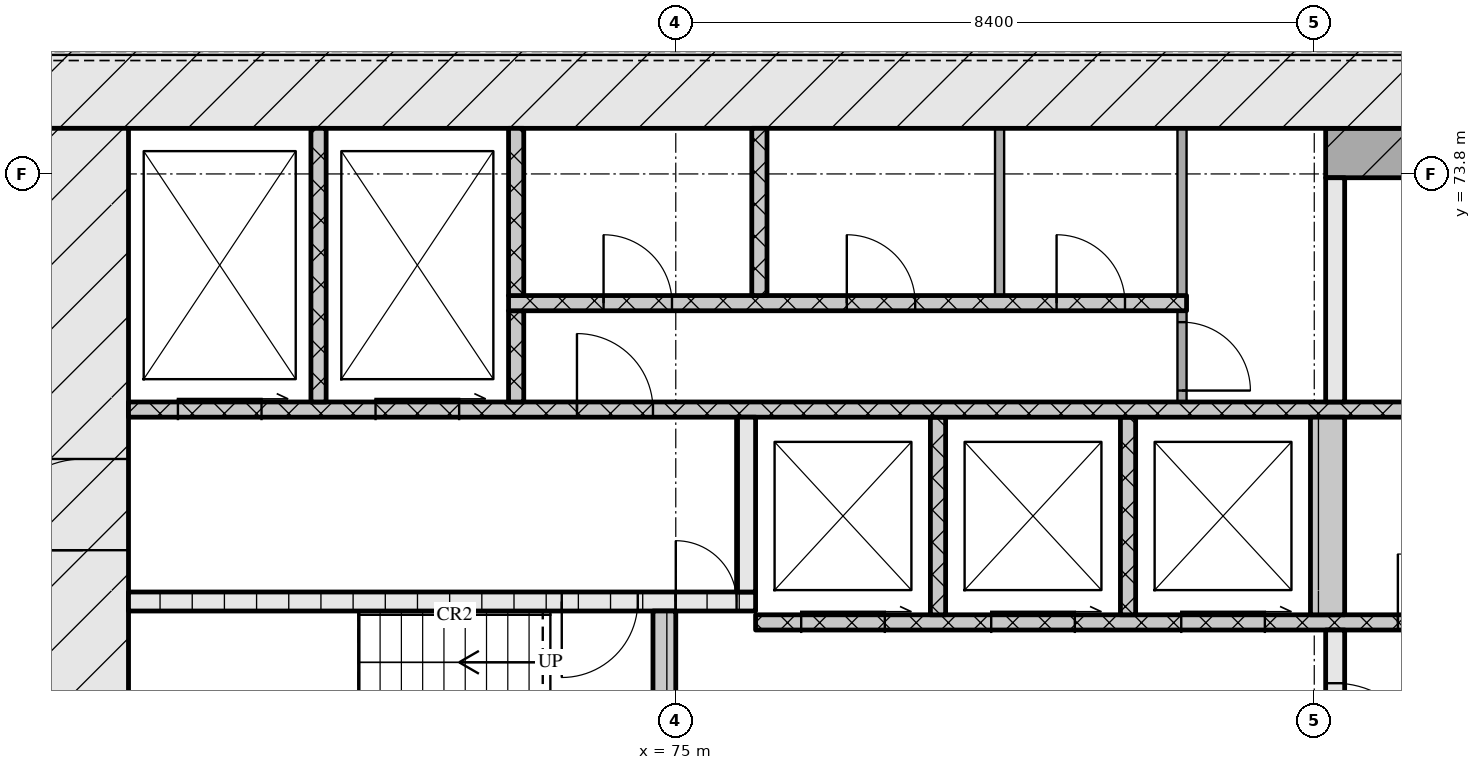
"""IFC4 building model, lengths in metres.
Left out: names, types, materials, properties, quantities, classifications, styles, units other than length and angle.
Written with IfcOpenShell. Run it as: python <this file> out.ifc"""

import sys

from ifc_helpers import new_model, si_unit, direction, frame, frame_2d, origin, place, context, subcontext, project, spatial, rectangle, extrude, element, fill, save


model = new_model("IFC4")
c1 = context("Model", 3, precision=1e-05, world=origin(), true_north=direction((0.0, 1.0)))
c2 = subcontext(c1, "Body", "Model", "MODEL_VIEW")
j1 = project(units=[si_unit("LENGTHUNIT", "METRE"), si_unit("PLANEANGLEUNIT", "RADIAN")], contexts=[c1])
p1 = place(None, origin())
s1 = spatial("IfcSite", under=j1, at=p1, CompositionType="ELEMENT")
p2 = place(p1, origin())
s2 = spatial("IfcBuilding", under=s1, at=p2, CompositionType="ELEMENT")
p3 = place(p2, frame((0.0, 0.0, 44.4)))
s3 = spatial("IfcBuildingStorey", under=s2, at=p3, CompositionType="ELEMENT", Elevation=44.4)
p4 = place(p3, frame((66.6, 75.0, 0.0), z_axis=(0.0, 0.0, 1.0), x_axis=(1.0, 0.0, 0.0)))
e1 = element("IfcWall", 1, at=p4, inside=s3, PredefinedType="SOLIDWALL", context=c2, shape_type="SweptSolid", body=[
    extrude(rectangle(XDim=42.0, YDim=1.2, at=frame_2d((21.0, 0.0))), origin(), (0.0, 0.0, 1.0), 3.32),
])
p5 = place(p3, frame((67.2, 62.4, 0.0), z_axis=(0.0, 0.0, 1.0), x_axis=(0.0, 1.0, 0.0)))
e2 = element("IfcWall", 2, at=p5, inside=s3, PredefinedType="SOLIDWALL", context=c2, shape_type="SweptSolid", body=[
    extrude(rectangle(XDim=12.0, YDim=1.2, at=frame_2d((6.0, 0.0))), origin(), (0.0, 0.0, 1.0), 3.32),
])
p6 = place(p5, frame((6.45, 0.0, 0.0)))
e3 = element("IfcOpeningElement", 3, at=p6, cuts=e2, PredefinedType="OPENING", context=c2, shape_type="SweptSolid", body=[
    extrude(rectangle(XDim=1.2, YDim=2.1, at=frame_2d((0.6, 1.05))), frame((0.0, 0.61, 0.0), z_axis=(0.0, -1.0, 0.0), x_axis=(1.0, 0.0, 0.0)), (0.0, 0.0, 1.0), 1.22),
])
p7 = place(p3, frame((74.85, 65.2, 0.0), z_axis=(0.0, 0.0, 1.0), x_axis=(0.0, 1.0, 0.0)))
e4 = element("IfcWall", 4, at=p7, inside=s3, PredefinedType="SOLIDWALL", context=c2, shape_type="SweptSolid", body=[
    extrude(rectangle(XDim=2.85, YDim=0.3, at=frame_2d((1.425, 0.0))), origin(), (0.0, 0.0, 1.0), 3.32),
])
p8 = place(p3, frame((83.675, 65.2, 0.0), z_axis=(0.0, 0.0, 1.0), x_axis=(0.0, 1.0, 0.0)))
e5 = element("IfcWall", 5, at=p8, inside=s3, PredefinedType="SOLIDWALL", context=c2, shape_type="SweptSolid", body=[
    extrude(rectangle(XDim=2.6, YDim=0.25, at=frame_2d((1.3, 0.0))), origin(), (0.0, 0.0, 1.0), 3.32),
])
p9 = place(p8, frame((0.7, 0.0, 0.0)))
e6 = element("IfcOpeningElement", 6, at=p9, cuts=e5, PredefinedType="OPENING", context=c2, shape_type="SweptSolid", body=[
    extrude(rectangle(XDim=1.2, YDim=2.1, at=frame_2d((0.6, 1.05))), frame((0.0, 0.135, 0.0), z_axis=(0.0, -1.0, 0.0), x_axis=(1.0, 0.0, 0.0)), (0.0, 0.0, 1.0), 0.27),
])
p10 = place(p3, frame((76.05, 67.9, 0.0), z_axis=(0.0, 0.0, 1.0), x_axis=(1.0, 0.0, 0.0)))
e7 = element("IfcWall", 7, at=p10, inside=s3, PredefinedType="SOLIDWALL", context=c2, shape_type="SweptSolid", body=[
    extrude(rectangle(XDim=23.1, YDim=0.2, at=frame_2d((11.55, 0.0))), origin(), (0.0, 0.0, 1.0), 3.32),
])
p11 = place(p10, frame((0.6, 0.0, 0.0)))
e8 = element("IfcOpeningElement", 8, at=p11, cuts=e7, PredefinedType="OPENING", context=c2, shape_type="SweptSolid", body=[
    extrude(rectangle(XDim=1.1, YDim=2.1, at=frame_2d((0.55, 1.05))), frame((0.0, 0.11, 0.0), z_axis=(0.0, -1.0, 0.0), x_axis=(1.0, 0.0, 0.0)), (0.0, 0.0, 1.0), 0.22),
])
p12 = place(p10, frame((3.1, 0.0, 0.0)))
e9 = element("IfcOpeningElement", 9, at=p12, cuts=e7, PredefinedType="OPENING", context=c2, shape_type="SweptSolid", body=[
    extrude(rectangle(XDim=1.1, YDim=2.1, at=frame_2d((0.55, 1.05))), frame((0.0, 0.11, 0.0), z_axis=(0.0, -1.0, 0.0), x_axis=(1.0, 0.0, 0.0)), (0.0, 0.0, 1.0), 0.22),
])
p13 = place(p10, frame((5.6, 0.0, 0.0)))
e10 = element("IfcOpeningElement", 10, at=p13, cuts=e7, PredefinedType="OPENING", context=c2, shape_type="SweptSolid", body=[
    extrude(rectangle(XDim=1.1, YDim=2.1, at=frame_2d((0.55, 1.05))), frame((0.0, 0.11, 0.0), z_axis=(0.0, -1.0, 0.0), x_axis=(1.0, 0.0, 0.0)), (0.0, 0.0, 1.0), 0.22),
])
p14 = place(p10, frame((8.45, 0.0, 0.0)))
e11 = element("IfcOpeningElement", 11, at=p14, cuts=e7, PredefinedType="OPENING", context=c2, shape_type="SweptSolid", body=[
    extrude(rectangle(XDim=0.9, YDim=2.1, at=frame_2d((0.45, 1.05))), frame((0.0, 0.11, 0.0), z_axis=(0.0, -1.0, 0.0), x_axis=(1.0, 0.0, 0.0)), (0.0, 0.0, 1.0), 0.22),
])
p15 = place(p10, frame((10.91, 0.0, 0.0)))
e12 = element("IfcOpeningElement", 12, at=p15, cuts=e7, PredefinedType="OPENING", context=c2, shape_type="SweptSolid", body=[
    extrude(rectangle(XDim=0.9, YDim=2.1, at=frame_2d((0.45, 1.05))), frame((0.0, 0.11, 0.0), z_axis=(0.0, -1.0, 0.0), x_axis=(1.0, 0.0, 0.0)), (0.0, 0.0, 1.0), 0.22),
])
p16 = place(p10, frame((13.55, 0.0, 0.0)))
e13 = element("IfcOpeningElement", 13, at=p16, cuts=e7, PredefinedType="OPENING", context=c2, shape_type="SweptSolid", body=[
    extrude(rectangle(XDim=1.0, YDim=2.1, at=frame_2d((0.5, 1.05))), frame((0.0, 0.11, 0.0), z_axis=(0.0, -1.0, 0.0), x_axis=(1.0, 0.0, 0.0)), (0.0, 0.0, 1.0), 0.22),
])
for number, where, z_axis, x_axis in (
    (14, (78.45, 68.0, 0.0), (0.0, 0.0, 1.0), (0.0, 1.0, 0.0)),
    (15, (80.95, 68.0, 0.0), (0.0, 0.0, 1.0), (0.0, 1.0, 0.0)),
):
    element("IfcWall", number, at=place(p3, frame(where, z_axis=z_axis, x_axis=x_axis)), inside=s3, PredefinedType="SOLIDWALL", context=c2, shape_type="SweptSolid", body=[
        extrude(rectangle(XDim=2.6, YDim=0.2, at=frame_2d((1.3, 0.0))), origin(), (0.0, 0.0, 1.0), 3.32),
    ])
p17 = place(p3, frame((83.575, 68.0, 0.0), z_axis=(0.0, 0.0, 1.0), x_axis=(0.0, 1.0, 0.0)))
e16 = element("IfcWall", 16, at=p17, inside=s3, PredefinedType="SOLIDWALL", context=c2, shape_type="SweptSolid", body=[
    extrude(rectangle(XDim=2.6, YDim=0.45, at=frame_2d((1.3, 0.0))), origin(), (0.0, 0.0, 1.0), 3.32),
])
p18 = place(p3, frame((67.8, 68.175, 0.0), z_axis=(0.0, 0.0, 1.0), x_axis=(1.0, 0.0, 0.0)))
e17 = element("IfcWall", 17, at=p18, inside=s3, PredefinedType="SOLIDWALL", context=c2, shape_type="SweptSolid", body=[
    extrude(rectangle(XDim=8.25, YDim=0.25, at=frame_2d((4.125, 0.0))), origin(), (0.0, 0.0, 1.0), 3.32),
])
p19 = place(p18, frame((5.7, 0.0, 0.0)))
e18 = element("IfcOpeningElement", 18, at=p19, cuts=e17, PredefinedType="OPENING", context=c2, shape_type="SweptSolid", body=[
    extrude(rectangle(XDim=1.0, YDim=2.1, at=frame_2d((0.5, 1.05))), frame((0.0, 0.135, 0.0), z_axis=(0.0, -1.0, 0.0), x_axis=(1.0, 0.0, 0.0)), (0.0, 0.0, 1.0), 0.27),
])
p20 = place(p18, frame((7.2, 0.0, 0.0)))
e19 = element("IfcOpeningElement", 19, at=p20, cuts=e17, PredefinedType="OPENING", context=c2, shape_type="SweptSolid", body=[
    extrude(rectangle(XDim=0.8, YDim=2.1, at=frame_2d((0.4, 1.05))), frame((0.0, 0.135, 0.0), z_axis=(0.0, -1.0, 0.0), x_axis=(1.0, 0.0, 0.0)), (0.0, 0.0, 1.0), 0.27),
])
p21 = place(p3, frame((75.925, 68.3, 0.0), z_axis=(0.0, 0.0, 1.0), x_axis=(0.0, 1.0, 0.0)))
e20 = element("IfcWall", 20, at=p21, inside=s3, PredefinedType="SOLIDWALL", context=c2, shape_type="SweptSolid", body=[
    extrude(rectangle(XDim=2.3, YDim=0.25, at=frame_2d((1.15, 0.0))), origin(), (0.0, 0.0, 1.0), 3.32),
])
p22 = place(p3, frame((67.8, 70.7, 0.0), z_axis=(0.0, 0.0, 1.0), x_axis=(1.0, 0.0, 0.0)))
e21 = element("IfcWall", 21, at=p22, inside=s3, PredefinedType="SOLIDWALL", context=c2, shape_type="SweptSolid", body=[
    extrude(rectangle(XDim=39.6, YDim=0.2, at=frame_2d((19.8, 0.0))), origin(), (0.0, 0.0, 1.0), 3.32),
])
p23 = place(p22, frame((0.65, 0.0, 0.0)))
e22 = element("IfcOpeningElement", 22, at=p23, cuts=e21, PredefinedType="OPENING", context=c2, shape_type="SweptSolid", body=[
    extrude(rectangle(XDim=1.1, YDim=2.1, at=frame_2d((0.55, 1.05))), frame((0.0, 0.11, 0.0), z_axis=(0.0, -1.0, 0.0), x_axis=(1.0, 0.0, 0.0)), (0.0, 0.0, 1.0), 0.22),
])
p24 = place(p22, frame((3.25, 0.0, 0.0)))
e23 = element("IfcOpeningElement", 23, at=p24, cuts=e21, PredefinedType="OPENING", context=c2, shape_type="SweptSolid", body=[
    extrude(rectangle(XDim=1.1, YDim=2.1, at=frame_2d((0.55, 1.05))), frame((0.0, 0.11, 0.0), z_axis=(0.0, -1.0, 0.0), x_axis=(1.0, 0.0, 0.0)), (0.0, 0.0, 1.0), 0.22),
])
p25 = place(p22, frame((5.9, 0.0, 0.0)))
e24 = element("IfcOpeningElement", 24, at=p25, cuts=e21, PredefinedType="OPENING", context=c2, shape_type="SweptSolid", body=[
    extrude(rectangle(XDim=1.0, YDim=2.1, at=frame_2d((0.5, 1.05))), frame((0.0, 0.11, 0.0), z_axis=(0.0, -1.0, 0.0), x_axis=(1.0, 0.0, 0.0)), (0.0, 0.0, 1.0), 0.22),
])
p26 = place(p22, frame((21.7, 0.0, 0.0)))
e25 = element("IfcOpeningElement", 25, at=p26, cuts=e21, PredefinedType="OPENING", context=c2, shape_type="SweptSolid", body=[
    extrude(rectangle(XDim=1.0, YDim=2.1, at=frame_2d((0.5, 1.05))), frame((0.0, 0.11, 0.0), z_axis=(0.0, -1.0, 0.0), x_axis=(1.0, 0.0, 0.0)), (0.0, 0.0, 1.0), 0.22),
])
p27 = place(p22, frame((32.7, 0.0, 0.0)))
e26 = element("IfcOpeningElement", 26, at=p27, cuts=e21, PredefinedType="OPENING", context=c2, shape_type="SweptSolid", body=[
    extrude(rectangle(XDim=1.0, YDim=2.1, at=frame_2d((0.5, 1.05))), frame((0.0, 0.11, 0.0), z_axis=(0.0, -1.0, 0.0), x_axis=(1.0, 0.0, 0.0)), (0.0, 0.0, 1.0), 0.22),
])
p28 = place(p22, frame((35.25, 0.0, 0.0)))
e27 = element("IfcOpeningElement", 27, at=p28, cuts=e21, PredefinedType="OPENING", context=c2, shape_type="SweptSolid", body=[
    extrude(rectangle(XDim=1.1, YDim=2.1, at=frame_2d((0.55, 1.05))), frame((0.0, 0.11, 0.0), z_axis=(0.0, -1.0, 0.0), x_axis=(1.0, 0.0, 0.0)), (0.0, 0.0, 1.0), 0.22),
])
p29 = place(p22, frame((37.85, 0.0, 0.0)))
e28 = element("IfcOpeningElement", 28, at=p29, cuts=e21, PredefinedType="OPENING", context=c2, shape_type="SweptSolid", body=[
    extrude(rectangle(XDim=1.1, YDim=2.1, at=frame_2d((0.55, 1.05))), frame((0.0, 0.11, 0.0), z_axis=(0.0, -1.0, 0.0), x_axis=(1.0, 0.0, 0.0)), (0.0, 0.0, 1.0), 0.22),
])
p30 = place(p3, frame((70.3, 70.8, 0.0), z_axis=(0.0, 0.0, 1.0), x_axis=(0.0, 1.0, 0.0)))
e29 = element("IfcWall", 29, at=p30, inside=s3, PredefinedType="SOLIDWALL", context=c2, shape_type="SweptSolid", body=[
    extrude(rectangle(XDim=3.6, YDim=0.2, at=frame_2d((1.8, 0.0))), origin(), (0.0, 0.0, 1.0), 3.32),
])
p31 = place(p3, frame((72.9, 70.8, 0.0), z_axis=(0.0, 0.0, 1.0), x_axis=(0.0, 1.0, 0.0)))
e30 = element("IfcWall", 30, at=p31, inside=s3, PredefinedType="SOLIDWALL", context=c2, shape_type="SweptSolid", body=[
    extrude(rectangle(XDim=1.2, YDim=0.2, at=frame_2d((0.6, 0.0))), origin(), (0.0, 0.0, 1.0), 3.32),
])
p32 = place(p3, frame((81.66, 70.8, 0.0), z_axis=(0.0, 0.0, 1.0), x_axis=(0.0, 1.0, 0.0)))
e31 = element("IfcWall", 31, at=p32, inside=s3, PredefinedType="PARTITIONING", context=c2, shape_type="SweptSolid", body=[
    extrude(rectangle(XDim=1.2, YDim=0.12, at=frame_2d((0.6, 0.0))), origin(), (0.0, 0.0, 1.0), 3.32),
])
p33 = place(p32, frame((0.15, 0.0, 0.0)))
e32 = element("IfcOpeningElement", 32, at=p33, cuts=e31, PredefinedType="OPENING", context=c2, shape_type="SweptSolid", body=[
    extrude(rectangle(XDim=0.9, YDim=2.1, at=frame_2d((0.45, 1.05))), frame((0.0, 0.07, 0.0), z_axis=(0.0, -1.0, 0.0), x_axis=(1.0, 0.0, 0.0)), (0.0, 0.0, 1.0), 0.14),
])
p34 = place(p3, frame((83.675, 70.8, 0.0), z_axis=(0.0, 0.0, 1.0), x_axis=(0.0, 1.0, 0.0)))
e33 = element("IfcWall", 33, at=p34, inside=s3, PredefinedType="SOLIDWALL", context=c2, shape_type="SweptSolid", body=[
    extrude(rectangle(XDim=2.95, YDim=0.25, at=frame_2d((1.475, 0.0))), origin(), (0.0, 0.0, 1.0), 3.32),
])
p35 = place(p3, frame((72.8, 72.1, 0.0), z_axis=(0.0, 0.0, 1.0), x_axis=(1.0, 0.0, 0.0)))
e34 = element("IfcWall", 34, at=p35, inside=s3, PredefinedType="SOLIDWALL", context=c2, shape_type="SweptSolid", body=[
    extrude(rectangle(XDim=8.92, YDim=0.2, at=frame_2d((4.46, 0.0))), origin(), (0.0, 0.0, 1.0), 3.32),
])
p36 = place(p35, frame((1.25, 0.0, 0.0)))
e35 = element("IfcOpeningElement", 35, at=p36, cuts=e34, PredefinedType="OPENING", context=c2, shape_type="SweptSolid", body=[
    extrude(rectangle(XDim=0.9, YDim=2.1, at=frame_2d((0.45, 1.05))), frame((0.0, 0.11, 0.0), z_axis=(0.0, -1.0, 0.0), x_axis=(1.0, 0.0, 0.0)), (0.0, 0.0, 1.0), 0.22),
])
p37 = place(p35, frame((4.45, 0.0, 0.0)))
e36 = element("IfcOpeningElement", 36, at=p37, cuts=e34, PredefinedType="OPENING", context=c2, shape_type="SweptSolid", body=[
    extrude(rectangle(XDim=0.9, YDim=2.1, at=frame_2d((0.45, 1.05))), frame((0.0, 0.11, 0.0), z_axis=(0.0, -1.0, 0.0), x_axis=(1.0, 0.0, 0.0)), (0.0, 0.0, 1.0), 0.22),
])
p38 = place(p35, frame((7.21, 0.0, 0.0)))
e37 = element("IfcOpeningElement", 37, at=p38, cuts=e34, PredefinedType="OPENING", context=c2, shape_type="SweptSolid", body=[
    extrude(rectangle(XDim=0.9, YDim=2.1, at=frame_2d((0.45, 1.05))), frame((0.0, 0.11, 0.0), z_axis=(0.0, -1.0, 0.0), x_axis=(1.0, 0.0, 0.0)), (0.0, 0.0, 1.0), 0.22),
])
for number, where, z_axis, x_axis in (
    (38, (72.9, 72.2, 0.0), (0.0, 0.0, 1.0), (0.0, 1.0, 0.0)),
    (39, (76.1, 72.2, 0.0), (0.0, 0.0, 1.0), (0.0, 1.0, 0.0)),
):
    element("IfcWall", number, at=place(p3, frame(where, z_axis=z_axis, x_axis=x_axis)), inside=s3, PredefinedType="SOLIDWALL", context=c2, shape_type="SweptSolid", body=[
        extrude(rectangle(XDim=2.2, YDim=0.2, at=frame_2d((1.1, 0.0))), origin(), (0.0, 0.0, 1.0), 3.32),
    ])
for number, where, z_axis, x_axis in (
    (40, (79.26, 72.2, 0.0), (0.0, 0.0, 1.0), (0.0, 1.0, 0.0)),
    (41, (81.66, 72.2, 0.0), (0.0, 0.0, 1.0), (0.0, 1.0, 0.0)),
):
    element("IfcWall", number, at=place(p3, frame(where, z_axis=z_axis, x_axis=x_axis)), inside=s3, PredefinedType="PARTITIONING", context=c2, shape_type="SweptSolid", body=[
        extrude(rectangle(XDim=2.2, YDim=0.12, at=frame_2d((1.1, 0.0))), origin(), (0.0, 0.0, 1.0), 3.32),
    ])
p39 = place(p3, frame((83.55, 74.075, 0.0), z_axis=(0.0, 0.0, 1.0), x_axis=(1.0, 0.0, 0.0)))
e42 = element("IfcWall", 42, at=p39, inside=s3, PredefinedType="SOLIDWALL", context=c2, shape_type="SweptSolid", body=[
    extrude(rectangle(XDim=8.1, YDim=0.65, at=frame_2d((4.05, 0.0))), origin(), (0.0, 0.0, 1.0), 3.32),
])
p40 = place(p9, origin())
e43 = element("IfcDoor", 43, at=p40, inside=s3, OperationType="SINGLE_SWING_RIGHT", PredefinedType="DOOR", context=c2, shape_type="SweptSolid", body=[
    extrude(rectangle(XDim=1.2, YDim=2.1, at=frame_2d((0.6, 1.05))), frame((0.0, 0.025, 0.0), z_axis=(0.0, -1.0, 0.0), x_axis=(1.0, 0.0, 0.0)), (0.0, 0.0, 1.0), 0.05),
])
fill(e6, e43)
p41 = place(p11, origin())
e44 = element("IfcDoor", 44, at=p41, inside=s3, OperationType="SLIDING_TO_RIGHT", PredefinedType="DOOR", context=c2, shape_type="SweptSolid", body=[
    extrude(rectangle(XDim=1.1, YDim=2.1, at=frame_2d((0.55, 1.05))), frame((0.0, 0.025, 0.0), z_axis=(0.0, -1.0, 0.0), x_axis=(1.0, 0.0, 0.0)), (0.0, 0.0, 1.0), 0.05),
])
fill(e8, e44)
p42 = place(p12, origin())
e45 = element("IfcDoor", 45, at=p42, inside=s3, OperationType="SLIDING_TO_RIGHT", PredefinedType="DOOR", context=c2, shape_type="SweptSolid", body=[
    extrude(rectangle(XDim=1.1, YDim=2.1, at=frame_2d((0.55, 1.05))), frame((0.0, 0.025, 0.0), z_axis=(0.0, -1.0, 0.0), x_axis=(1.0, 0.0, 0.0)), (0.0, 0.0, 1.0), 0.05),
])
fill(e9, e45)
p43 = place(p13, origin())
e46 = element("IfcDoor", 46, at=p43, inside=s3, OperationType="SLIDING_TO_RIGHT", PredefinedType="DOOR", context=c2, shape_type="SweptSolid", body=[
    extrude(rectangle(XDim=1.1, YDim=2.1, at=frame_2d((0.55, 1.05))), frame((0.0, 0.025, 0.0), z_axis=(0.0, -1.0, 0.0), x_axis=(1.0, 0.0, 0.0)), (0.0, 0.0, 1.0), 0.05),
])
fill(e10, e46)
p44 = place(p14, origin())
e47 = element("IfcDoor", 47, at=p44, inside=s3, OperationType="SINGLE_SWING_LEFT", PredefinedType="DOOR", context=c2, shape_type="SweptSolid", body=[
    extrude(rectangle(XDim=0.9, YDim=2.1, at=frame_2d((0.45, 1.05))), frame((0.0, 0.025, 0.0), z_axis=(0.0, -1.0, 0.0), x_axis=(1.0, 0.0, 0.0)), (0.0, 0.0, 1.0), 0.05),
])
fill(e11, e47)
p45 = place(p19, origin())
e48 = element("IfcDoor", 48, at=p45, inside=s3, OperationType="SINGLE_SWING_RIGHT", PredefinedType="DOOR", context=c2, shape_type="SweptSolid", body=[
    extrude(rectangle(XDim=1.0, YDim=2.1, at=frame_2d((0.5, 1.05))), frame((0.0, 0.025, 0.0), z_axis=(0.0, -1.0, 0.0), x_axis=(1.0, 0.0, 0.0)), (0.0, 0.0, 1.0), 0.05),
])
fill(e18, e48)
p46 = place(p20, origin())
e49 = element("IfcDoor", 49, at=p46, inside=s3, OperationType="SINGLE_SWING_LEFT", PredefinedType="DOOR", context=c2, shape_type="SweptSolid", body=[
    extrude(rectangle(XDim=0.8, YDim=2.1, at=frame_2d((0.4, 1.05))), frame((0.0, 0.025, 0.0), z_axis=(0.0, -1.0, 0.0), x_axis=(1.0, 0.0, 0.0)), (0.0, 0.0, 1.0), 0.05),
])
fill(e19, e49)
p47 = place(p6, origin())
e50 = element("IfcDoor", 50, at=p47, inside=s3, OperationType="SINGLE_SWING_LEFT", PredefinedType="DOOR", context=c2, shape_type="SweptSolid", body=[
    extrude(rectangle(XDim=1.2, YDim=2.1, at=frame_2d((0.6, 1.05))), frame((0.0, 0.025, 0.0), z_axis=(0.0, -1.0, 0.0), x_axis=(1.0, 0.0, 0.0)), (0.0, 0.0, 1.0), 0.05),
])
fill(e3, e50)
p48 = place(p23, origin())
e51 = element("IfcDoor", 51, at=p48, inside=s3, OperationType="SLIDING_TO_RIGHT", PredefinedType="DOOR", context=c2, shape_type="SweptSolid", body=[
    extrude(rectangle(XDim=1.1, YDim=2.1, at=frame_2d((0.55, 1.05))), frame((0.0, 0.025, 0.0), z_axis=(0.0, -1.0, 0.0), x_axis=(1.0, 0.0, 0.0)), (0.0, 0.0, 1.0), 0.05),
])
fill(e22, e51)
p49 = place(p24, origin())
e52 = element("IfcDoor", 52, at=p49, inside=s3, OperationType="SLIDING_TO_RIGHT", PredefinedType="DOOR", context=c2, shape_type="SweptSolid", body=[
    extrude(rectangle(XDim=1.1, YDim=2.1, at=frame_2d((0.55, 1.05))), frame((0.0, 0.025, 0.0), z_axis=(0.0, -1.0, 0.0), x_axis=(1.0, 0.0, 0.0)), (0.0, 0.0, 1.0), 0.05),
])
fill(e23, e52)
p50 = place(p25, origin())
e53 = element("IfcDoor", 53, at=p50, inside=s3, OperationType="SINGLE_SWING_LEFT", PredefinedType="DOOR", context=c2, shape_type="SweptSolid", body=[
    extrude(rectangle(XDim=1.0, YDim=2.1, at=frame_2d((0.5, 1.05))), frame((0.0, 0.025, 0.0), z_axis=(0.0, -1.0, 0.0), x_axis=(1.0, 0.0, 0.0)), (0.0, 0.0, 1.0), 0.05),
])
fill(e24, e53)
p51 = place(p33, origin())
e54 = element("IfcDoor", 54, at=p51, inside=s3, OperationType="SINGLE_SWING_RIGHT", PredefinedType="DOOR", context=c2, shape_type="SweptSolid", body=[
    extrude(rectangle(XDim=0.9, YDim=2.1, at=frame_2d((0.45, 1.05))), frame((0.0, 0.025, 0.0), z_axis=(0.0, -1.0, 0.0), x_axis=(1.0, 0.0, 0.0)), (0.0, 0.0, 1.0), 0.05),
])
fill(e32, e54)
p52 = place(p36, origin())
e55 = element("IfcDoor", 55, at=p52, inside=s3, OperationType="SINGLE_SWING_LEFT", PredefinedType="DOOR", context=c2, shape_type="SweptSolid", body=[
    extrude(rectangle(XDim=0.9, YDim=2.1, at=frame_2d((0.45, 1.05))), frame((0.0, 0.025, 0.0), z_axis=(0.0, -1.0, 0.0), x_axis=(1.0, 0.0, 0.0)), (0.0, 0.0, 1.0), 0.05),
])
fill(e35, e55)
p53 = place(p37, origin())
e56 = element("IfcDoor", 56, at=p53, inside=s3, OperationType="SINGLE_SWING_LEFT", PredefinedType="DOOR", context=c2, shape_type="SweptSolid", body=[
    extrude(rectangle(XDim=0.9, YDim=2.1, at=frame_2d((0.45, 1.05))), frame((0.0, 0.025, 0.0), z_axis=(0.0, -1.0, 0.0), x_axis=(1.0, 0.0, 0.0)), (0.0, 0.0, 1.0), 0.05),
])
fill(e36, e56)
p54 = place(p38, origin())
e57 = element("IfcDoor", 57, at=p54, inside=s3, OperationType="SINGLE_SWING_LEFT", PredefinedType="DOOR", context=c2, shape_type="SweptSolid", body=[
    extrude(rectangle(XDim=0.9, YDim=2.1, at=frame_2d((0.45, 1.05))), frame((0.0, 0.025, 0.0), z_axis=(0.0, -1.0, 0.0), x_axis=(1.0, 0.0, 0.0)), (0.0, 0.0, 1.0), 0.05),
])
fill(e37, e57)
save(model, sys.argv[1])
